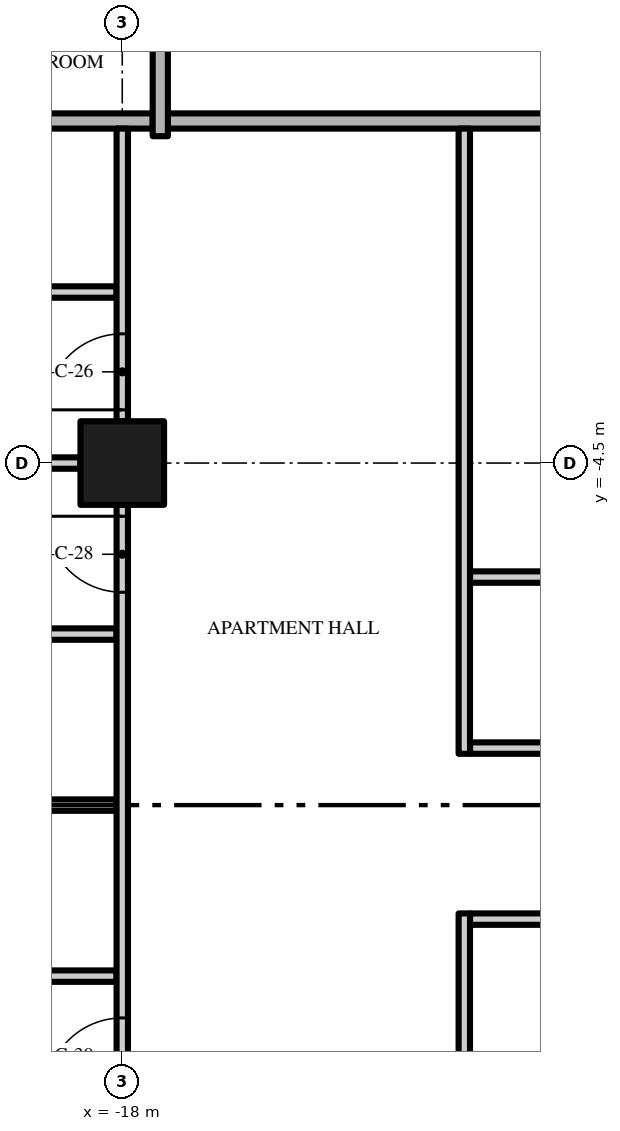
"""IFC4 building model, lengths in metres.
Left out: names, types, materials, properties, quantities, classifications, styles, units other than length and angle.
Written with IfcOpenShell. Run it as: python <this file> out.ifc"""

import sys

from ifc_helpers import new_model, si_unit, direction, frame, frame_2d, origin, origin_2d, place, context, subcontext, project, spatial, rectangle, extrude, element, fill, save


model = new_model("IFC4")
c1 = context("Model", 3, precision=1e-05, world=origin(), true_north=direction((0.0, 1.0)))
c2 = subcontext(c1, "Body", "Model", "MODEL_VIEW")
j1 = project(units=[si_unit("LENGTHUNIT", "METRE"), si_unit("PLANEANGLEUNIT", "RADIAN")], contexts=[c1])
p1 = place(None, origin())
s1 = spatial("IfcSite", under=j1, at=p1, CompositionType="ELEMENT")
p2 = place(p1, origin())
s2 = spatial("IfcBuilding", under=s1, at=p2, CompositionType="ELEMENT")
p3 = place(p2, frame((0.0, 0.0, 207.2)))
s3 = spatial("IfcBuildingStorey", under=s2, at=p3, CompositionType="ELEMENT", Elevation=207.2)
p4 = place(p3, frame((-18.0, -4.5, 0.0), z_axis=(0.0, 0.0, 1.0), x_axis=(1.0, 0.0, 0.0)))
e1 = element("IfcColumn", 1, at=p4, inside=s3, PredefinedType="COLUMN", context=c2, shape_type="SweptSolid", body=[
    extrude(rectangle(XDim=1.1, YDim=1.1, at=origin_2d()), origin(), (0.0, 0.0, 1.0), 3.5),
])
p5 = place(p3, frame((-20.925, -11.25, 0.0), z_axis=(0.0, 0.0, 1.0), x_axis=(1.0, 0.0, 0.0)))
e2 = element("IfcWall", 2, at=p5, inside=s3, PredefinedType="PARTITIONING", context=c2, shape_type="SweptSolid", body=[
    extrude(rectangle(XDim=2.85, YDim=0.15, at=frame_2d((1.425, 0.0))), origin(), (0.0, 0.0, 1.0), 3.5),
])
p6 = place(p3, frame((-13.425, -10.5, 0.0), z_axis=(0.0, 0.0, 1.0), x_axis=(1.0, 0.0, 0.0)))
e3 = element("IfcWall", 3, at=p6, inside=s3, PredefinedType="PARTITIONING", context=c2, shape_type="SweptSolid", body=[
    extrude(rectangle(XDim=4.35, YDim=0.15, at=frame_2d((2.175, 0.0))), origin(), (0.0, 0.0, 1.0), 3.5),
])
p7 = place(p3, frame((-20.925, -9.0, 0.0), z_axis=(0.0, 0.0, 1.0), x_axis=(1.0, 0.0, 0.0)))
e4 = element("IfcWall", 4, at=p7, inside=s3, PredefinedType="PARTITIONING", context=c2, shape_type="SweptSolid", body=[
    extrude(rectangle(XDim=2.85, YDim=0.15, at=frame_2d((1.425, 0.0))), origin(), (0.0, 0.0, 1.0), 3.5),
])
p8 = place(p3, frame((-13.425, -8.25, 0.0), z_axis=(0.0, 0.0, 1.0), x_axis=(1.0, 0.0, 0.0)))
e5 = element("IfcWall", 5, at=p8, inside=s3, PredefinedType="PARTITIONING", context=c2, shape_type="SweptSolid", body=[
    extrude(rectangle(XDim=4.35, YDim=0.15, at=frame_2d((2.175, 0.0))), origin(), (0.0, 0.0, 1.0), 3.5),
])
p9 = place(p8, frame((1.75, 0.0, 0.0)))
e6 = element("IfcOpeningElement", 6, at=p9, cuts=e5, PredefinedType="OPENING", context=c2, shape_type="SweptSolid", body=[
    extrude(rectangle(XDim=0.9, YDim=2.1, at=frame_2d((0.45, 1.05))), frame((0.0, 0.085, 0.0), z_axis=(0.0, -1.0, 0.0), x_axis=(1.0, 0.0, 0.0)), (0.0, 0.0, 1.0), 0.17),
])
p10 = place(p3, frame((-20.925, -6.75, 0.0), z_axis=(0.0, 0.0, 1.0), x_axis=(1.0, 0.0, 0.0)))
e7 = element("IfcWall", 7, at=p10, inside=s3, PredefinedType="PARTITIONING", context=c2, shape_type="SweptSolid", body=[
    extrude(rectangle(XDim=2.85, YDim=0.15, at=frame_2d((1.425, 0.0))), origin(), (0.0, 0.0, 1.0), 3.5),
])
p11 = place(p3, frame((-13.425, -6.0, 0.0), z_axis=(0.0, 0.0, 1.0), x_axis=(1.0, 0.0, 0.0)))
e8 = element("IfcWall", 8, at=p11, inside=s3, PredefinedType="PARTITIONING", context=c2, shape_type="SweptSolid", body=[
    extrude(rectangle(XDim=4.35, YDim=0.15, at=frame_2d((2.175, 0.0))), origin(), (0.0, 0.0, 1.0), 3.5),
])
p12 = place(p3, frame((-26.0, -4.5, 0.0), z_axis=(0.0, 0.0, 1.0), x_axis=(1.0, 0.0, 0.0)))
e9 = element("IfcWall", 9, at=p12, inside=s3, PredefinedType="PARTITIONING", context=c2, shape_type="SweptSolid", body=[
    extrude(rectangle(XDim=7.45, YDim=0.15, at=frame_2d((3.725, 0.0))), origin(), (0.0, 0.0, 1.0), 3.5),
])
p13 = place(p3, frame((-20.925, -2.25, 0.0), z_axis=(0.0, 0.0, 1.0), x_axis=(1.0, 0.0, 0.0)))
e10 = element("IfcWall", 10, at=p13, inside=s3, PredefinedType="PARTITIONING", context=c2, shape_type="SweptSolid", body=[
    extrude(rectangle(XDim=2.85, YDim=0.15, at=frame_2d((1.425, 0.0))), origin(), (0.0, 0.0, 1.0), 3.5),
])
p14 = place(p3, frame((-17.4, 0.0, 0.0), z_axis=(0.0, 0.0, 1.0), x_axis=(1.0, 0.0, 0.0)))
e11 = element("IfcWall", 11, at=p14, inside=s3, PredefinedType="PARTITIONING", context=c2, shape_type="SweptSolid", body=[
    extrude(rectangle(XDim=12.8, YDim=0.2, at=frame_2d((6.4, 0.0))), origin(), (0.0, 0.0, 1.0), 3.5),
])
p15 = place(p3, frame((-26.7, 0.0, 0.0), z_axis=(0.0, 0.0, 1.0), x_axis=(1.0, 0.0, 0.0)))
e12 = element("IfcWall", 12, at=p15, inside=s3, PredefinedType="PARTITIONING", context=c2, shape_type="SweptSolid", body=[
    extrude(rectangle(XDim=9.1, YDim=0.2, at=frame_2d((4.55, 0.0))), origin(), (0.0, 0.0, 1.0), 3.5),
])
p16 = place(p3, frame((-18.0, -12.95, 0.0), z_axis=(0.0, 0.0, 1.0), x_axis=(0.0, 1.0, 0.0)))
e13 = element("IfcWall", 13, at=p16, inside=s3, PredefinedType="PARTITIONING", context=c2, shape_type="SweptSolid", body=[
    extrude(rectangle(XDim=7.9, YDim=0.15, at=frame_2d((3.95, 0.0))), origin(), (0.0, 0.0, 1.0), 3.5),
])
p17 = place(p16, frame((6.75, 0.0, 0.0)))
e14 = element("IfcOpeningElement", 14, at=p17, cuts=e13, PredefinedType="OPENING", context=c2, shape_type="SweptSolid", body=[
    extrude(rectangle(XDim=1.0, YDim=2.4, at=frame_2d((0.5, 1.2))), frame((0.0, 0.085, 0.0), z_axis=(0.0, -1.0, 0.0), x_axis=(1.0, 0.0, 0.0)), (0.0, 0.0, 1.0), 0.17),
])
p18 = place(p16, frame((0.15, 0.0, 0.0)))
e15 = element("IfcOpeningElement", 15, at=p18, cuts=e13, PredefinedType="OPENING", context=c2, shape_type="SweptSolid", body=[
    extrude(rectangle(XDim=1.0, YDim=2.4, at=frame_2d((0.5, 1.2))), frame((0.0, 0.085, 0.0), z_axis=(0.0, -1.0, 0.0), x_axis=(1.0, 0.0, 0.0)), (0.0, 0.0, 1.0), 0.17),
])
p19 = place(p3, frame((-18.0, -3.95, 0.0), z_axis=(0.0, 0.0, 1.0), x_axis=(0.0, 1.0, 0.0)))
e16 = element("IfcWall", 16, at=p19, inside=s3, PredefinedType="PARTITIONING", context=c2, shape_type="SweptSolid", body=[
    extrude(rectangle(XDim=3.85, YDim=0.15, at=frame_2d((1.925, 0.0))), origin(), (0.0, 0.0, 1.0), 3.5),
])
p20 = place(p19, frame((0.15, 0.0, 0.0)))
e17 = element("IfcOpeningElement", 17, at=p20, cuts=e16, PredefinedType="OPENING", context=c2, shape_type="SweptSolid", body=[
    extrude(rectangle(XDim=1.0, YDim=2.4, at=frame_2d((0.5, 1.2))), frame((0.0, 0.085, 0.0), z_axis=(0.0, -1.0, 0.0), x_axis=(1.0, 0.0, 0.0)), (0.0, 0.0, 1.0), 0.17),
])
p21 = place(p3, frame((-17.5, -0.2, 0.0), z_axis=(0.0, 0.0, 1.0), x_axis=(0.0, 1.0, 0.0)))
e18 = element("IfcWall", 18, at=p21, inside=s3, PredefinedType="PARTITIONING", context=c2, shape_type="SweptSolid", body=[
    extrude(rectangle(XDim=4.15, YDim=0.2, at=frame_2d((2.075, 0.0))), origin(), (0.0, 0.0, 1.0), 3.5),
])
p22 = place(p3, frame((-13.5, -10.425, 0.0), z_axis=(0.0, 0.0, 1.0), x_axis=(0.0, -1.0, 0.0)))
e19 = element("IfcWall", 19, at=p22, inside=s3, PredefinedType="PARTITIONING", context=c2, shape_type="SweptSolid", body=[
    extrude(rectangle(XDim=11.775, YDim=0.15, at=frame_2d((5.888, 0.0))), origin(), (0.0, 0.0, 1.0), 3.5),
])
p23 = place(p22, frame((10.825, 0.0, 0.0)))
e20 = element("IfcOpeningElement", 20, at=p23, cuts=e19, PredefinedType="OPENING", context=c2, shape_type="SweptSolid", body=[
    extrude(rectangle(XDim=0.8, YDim=2.0, at=frame_2d((0.4, 1.0))), frame((0.0, 0.085, 0.0), z_axis=(0.0, -1.0, 0.0), x_axis=(1.0, 0.0, 0.0)), (0.0, 0.0, 1.0), 0.17),
])
p24 = place(p3, frame((-13.5, -8.325, 0.0), z_axis=(0.0, 0.0, 1.0), x_axis=(0.0, 1.0, 0.0)))
e21 = element("IfcWall", 21, at=p24, inside=s3, PredefinedType="PARTITIONING", context=c2, shape_type="SweptSolid", body=[
    extrude(rectangle(XDim=8.225, YDim=0.15, at=frame_2d((4.112, 0.0))), origin(), (0.0, 0.0, 1.0), 3.5),
])
p25 = place(p20, origin())
e22 = element("IfcDoor", 22, at=p25, inside=s3, OperationType="SINGLE_SWING_LEFT", PredefinedType="DOOR", context=c2, shape_type="SweptSolid", body=[
    extrude(rectangle(XDim=1.0, YDim=2.4, at=frame_2d((0.5, 1.2))), frame((0.0, 0.025, 0.0), z_axis=(0.0, -1.0, 0.0), x_axis=(1.0, 0.0, 0.0)), (0.0, 0.0, 1.0), 0.05),
])
fill(e17, e22)
p26 = place(p17, origin())
e23 = element("IfcDoor", 23, at=p26, inside=s3, OperationType="SINGLE_SWING_RIGHT", PredefinedType="DOOR", context=c2, shape_type="SweptSolid", body=[
    extrude(rectangle(XDim=1.0, YDim=2.4, at=frame_2d((0.5, 1.2))), frame((0.0, 0.025, 0.0), z_axis=(0.0, -1.0, 0.0), x_axis=(1.0, 0.0, 0.0)), (0.0, 0.0, 1.0), 0.05),
])
fill(e14, e23)
p27 = place(p18, origin())
e24 = element("IfcDoor", 24, at=p27, inside=s3, OperationType="SINGLE_SWING_LEFT", PredefinedType="DOOR", context=c2, shape_type="SweptSolid", body=[
    extrude(rectangle(XDim=1.0, YDim=2.4, at=frame_2d((0.5, 1.2))), frame((0.0, 0.025, 0.0), z_axis=(0.0, -1.0, 0.0), x_axis=(1.0, 0.0, 0.0)), (0.0, 0.0, 1.0), 0.05),
])
fill(e15, e24)
save(model, sys.argv[1])
